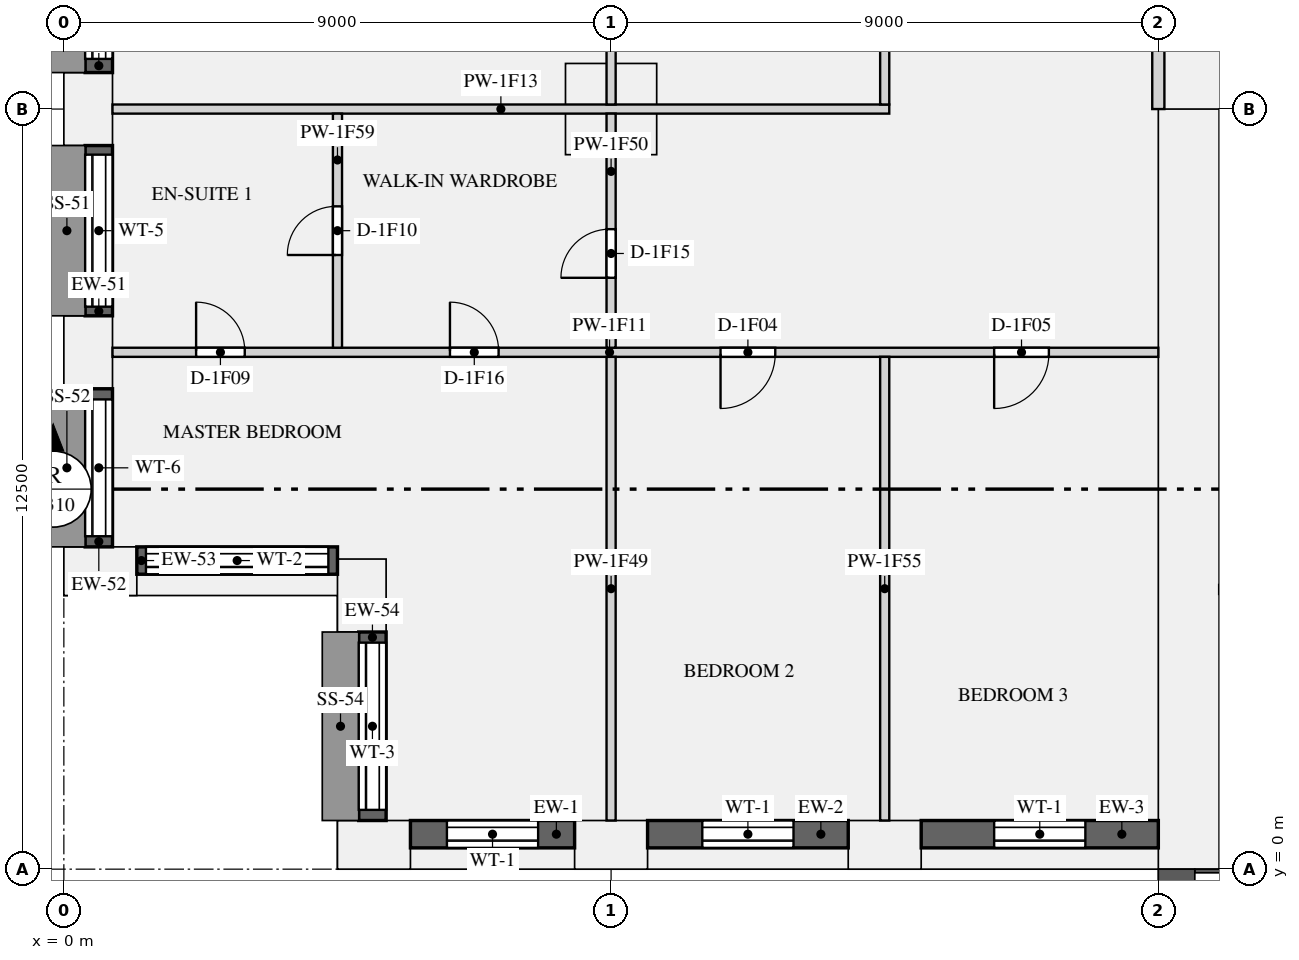
"""IFC4 building model, lengths in metres.
Left out: names, types, materials, properties, quantities, classifications, styles, units other than length and angle.
Written with IfcOpenShell. Run it as: python <this file> out.ifc"""

import sys

from ifc_helpers import new_model, si_unit, direction, frame, frame_2d, origin, origin_2d, place, context, subcontext, project, spatial, rectangle, extrude, element, fill, save


model = new_model("IFC4")
c1 = context("Model", 3, precision=1e-05, world=origin(), true_north=direction((0.0, 1.0)))
c2 = subcontext(c1, "Body", "Model", "MODEL_VIEW")
j1 = project(units=[si_unit("LENGTHUNIT", "METRE"), si_unit("PLANEANGLEUNIT", "RADIAN")], contexts=[c1])
p1 = place(None, origin())
s1 = spatial("IfcSite", under=j1, at=p1, CompositionType="ELEMENT")
p2 = place(p1, origin())
s2 = spatial("IfcBuilding", under=s1, at=p2, CompositionType="ELEMENT")
p3 = place(p2, frame((0.0, 0.0, 60.45)))
s3 = spatial("IfcBuildingStorey", under=s2, at=p3, CompositionType="ELEMENT", Elevation=60.45)
for number, where, z_axis, x_axis in (
    (1, (5.1, 0.4, 0.0), (0.0, 0.0, 1.0), (1.0, 0.0, 0.0)),
    (2, (9.0, 0.4, 0.0), (0.0, 0.0, 1.0), (1.0, 0.0, 0.0)),
    (3, (13.5, 0.4, 0.0), (0.0, 0.0, 1.0), (1.0, 0.0, 0.0)),
    (4, (0.4, 12.5, 0.0), (0.0, 0.0, 1.0), (0.0, -1.0, 0.0)),
    (5, (0.4, 8.5, 0.0), (0.0, 0.0, 1.0), (0.0, -1.0, 0.0)),
    (6, (0.6, 4.9, 0.0), (0.0, 0.0, 1.0), (1.0, 0.0, 0.0)),
    (7, (4.9, 4.5, 0.0), (0.0, 0.0, 1.0), (0.0, -1.0, 0.0)),
):
    element("IfcColumn", number, at=place(p3, frame(where, z_axis=z_axis, x_axis=x_axis)), inside=s3, PredefinedType="USERDEFINED", context=c2, shape_type="SweptSolid", body=[
        extrude(rectangle(XDim=1.2, YDim=0.8, at=origin_2d()), origin(), (0.0, 0.0, 1.0), 3.15),
    ])
p4 = place(p3, frame((9.0, 12.5, 0.0), z_axis=(0.0, 0.0, 1.0), x_axis=(1.0, 0.0, 0.0)))
e8 = element("IfcColumn", 8, at=p4, inside=s3, PredefinedType="COLUMN", context=c2, shape_type="SweptSolid", body=[
    extrude(rectangle(XDim=1.5, YDim=1.5, at=origin_2d()), origin(), (0.0, 0.0, 1.0), 3.15),
])
p5 = place(p3, frame((18.5, 0.0, 0.0), z_axis=(0.0, 0.0, 1.0), x_axis=(0.0, 1.0, 0.0)))
e9 = element("IfcWall", 9, at=p5, inside=s3, PredefinedType="SHEAR", context=c2, shape_type="SweptSolid", body=[
    extrude(rectangle(XDim=12.5, YDim=1.0, at=frame_2d((6.25, 0.0))), origin(), (0.0, 0.0, 1.0), 3.15),
])
p6 = place(p3, frame((5.7, 0.575, 0.9), z_axis=(0.0, 0.0, 1.0), x_axis=(1.0, 0.0, 0.0)))
e10 = element("IfcWall", 10, at=p6, inside=s3, PredefinedType="SOLIDWALL", context=c2, shape_type="SweptSolid", body=[
    extrude(rectangle(XDim=2.7, YDim=0.45, at=frame_2d((1.35, 0.0))), origin(), (0.0, 0.0, 1.0), 1.93),
])
p7 = place(p6, frame((0.6, 0.0, 0.15)))
e11 = element("IfcOpeningElement", 11, at=p7, cuts=e10, PredefinedType="OPENING", context=c2, shape_type="SweptSolid", body=[
    extrude(rectangle(XDim=1.5, YDim=1.5, at=frame_2d((0.75, 0.75))), frame((0.0, 0.235, 0.0), z_axis=(0.0, -1.0, 0.0), x_axis=(1.0, 0.0, 0.0)), (0.0, 0.0, 1.0), 0.47),
])
p8 = place(p3, frame((9.6, 0.575, 0.9), z_axis=(0.0, 0.0, 1.0), x_axis=(1.0, 0.0, 0.0)))
e12 = element("IfcWall", 12, at=p8, inside=s3, PredefinedType="SOLIDWALL", context=c2, shape_type="SweptSolid", body=[
    extrude(rectangle(XDim=3.3, YDim=0.45, at=frame_2d((1.65, 0.0))), origin(), (0.0, 0.0, 1.0), 1.93),
])
p9 = place(p8, frame((0.9, 0.0, 0.15)))
e13 = element("IfcOpeningElement", 13, at=p9, cuts=e12, PredefinedType="OPENING", context=c2, shape_type="SweptSolid", body=[
    extrude(rectangle(XDim=1.5, YDim=1.5, at=frame_2d((0.75, 0.75))), frame((0.0, 0.235, 0.0), z_axis=(0.0, -1.0, 0.0), x_axis=(1.0, 0.0, 0.0)), (0.0, 0.0, 1.0), 0.47),
])
p10 = place(p3, frame((14.1, 0.575, 0.9), z_axis=(0.0, 0.0, 1.0), x_axis=(1.0, 0.0, 0.0)))
e14 = element("IfcWall", 14, at=p10, inside=s3, PredefinedType="SOLIDWALL", context=c2, shape_type="SweptSolid", body=[
    extrude(rectangle(XDim=3.9, YDim=0.45, at=frame_2d((1.95, 0.0))), origin(), (0.0, 0.0, 1.0), 1.93),
])
p11 = place(p10, frame((1.2, 0.0, 0.15)))
e15 = element("IfcOpeningElement", 15, at=p11, cuts=e14, PredefinedType="OPENING", context=c2, shape_type="SweptSolid", body=[
    extrude(rectangle(XDim=1.5, YDim=1.5, at=frame_2d((0.75, 0.75))), frame((0.0, 0.235, 0.0), z_axis=(0.0, -1.0, 0.0), x_axis=(1.0, 0.0, 0.0)), (0.0, 0.0, 1.0), 0.47),
])
p12 = place(p3, frame((0.575, 15.3, 0.9), z_axis=(0.0, 0.0, 1.0), x_axis=(0.0, -1.0, 0.0)))
e16 = element("IfcWall", 16, at=p12, inside=s3, PredefinedType="SOLIDWALL", context=c2, shape_type="SweptSolid", body=[
    extrude(rectangle(XDim=2.2, YDim=0.45, at=frame_2d((1.1, 0.0))), origin(), (0.0, 0.0, 1.0), 1.93),
])
p13 = place(p12, frame((0.225, 0.0, 0.15)))
e17 = element("IfcOpeningElement", 17, at=p13, cuts=e16, PredefinedType="OPENING", context=c2, shape_type="SweptSolid", body=[
    extrude(rectangle(XDim=1.75, YDim=1.5, at=frame_2d((0.875, 0.75))), frame((0.0, 0.235, 0.0), z_axis=(0.0, -1.0, 0.0), x_axis=(1.0, 0.0, 0.0)), (0.0, 0.0, 1.0), 0.47),
])
p14 = place(p3, frame((0.575, 11.9, 0.9), z_axis=(0.0, 0.0, 1.0), x_axis=(0.0, -1.0, 0.0)))
e18 = element("IfcWall", 18, at=p14, inside=s3, PredefinedType="SOLIDWALL", context=c2, shape_type="SweptSolid", body=[
    extrude(rectangle(XDim=2.8, YDim=0.45, at=frame_2d((1.4, 0.0))), origin(), (0.0, 0.0, 1.0), 1.93),
])
p15 = place(p14, frame((0.15, 0.0, 0.15)))
e19 = element("IfcOpeningElement", 19, at=p15, cuts=e18, PredefinedType="OPENING", context=c2, shape_type="SweptSolid", body=[
    extrude(rectangle(XDim=2.5, YDim=1.5, at=frame_2d((1.25, 0.75))), frame((0.0, 0.235, 0.0), z_axis=(0.0, -1.0, 0.0), x_axis=(1.0, 0.0, 0.0)), (0.0, 0.0, 1.0), 0.47),
])
p16 = place(p3, frame((0.575, 7.9, 0.9), z_axis=(0.0, 0.0, 1.0), x_axis=(0.0, -1.0, 0.0)))
e20 = element("IfcWall", 20, at=p16, inside=s3, PredefinedType="SOLIDWALL", context=c2, shape_type="SweptSolid", body=[
    extrude(rectangle(XDim=2.6, YDim=0.45, at=frame_2d((1.3, 0.0))), origin(), (0.0, 0.0, 1.0), 1.93),
])
p17 = place(p16, frame((0.175, 0.0, 0.15)))
e21 = element("IfcOpeningElement", 21, at=p17, cuts=e20, PredefinedType="OPENING", context=c2, shape_type="SweptSolid", body=[
    extrude(rectangle(XDim=2.25, YDim=1.5, at=frame_2d((1.125, 0.75))), frame((0.0, 0.235, 0.0), z_axis=(0.0, -1.0, 0.0), x_axis=(1.0, 0.0, 0.0)), (0.0, 0.0, 1.0), 0.47),
])
p18 = place(p3, frame((1.2, 5.075, 0.9), z_axis=(0.0, 0.0, 1.0), x_axis=(1.0, 0.0, 0.0)))
e22 = element("IfcWall", 22, at=p18, inside=s3, PredefinedType="SOLIDWALL", context=c2, shape_type="SweptSolid", body=[
    extrude(rectangle(XDim=3.3, YDim=0.45, at=frame_2d((1.65, 0.0))), origin(), (0.0, 0.0, 1.0), 1.93),
])
p19 = place(p18, frame((0.15, 0.0, 0.15)))
e23 = element("IfcOpeningElement", 23, at=p19, cuts=e22, PredefinedType="OPENING", context=c2, shape_type="SweptSolid", body=[
    extrude(rectangle(XDim=3.0, YDim=1.5, at=frame_2d((1.5, 0.75))), frame((0.0, 0.235, 0.0), z_axis=(0.0, -1.0, 0.0), x_axis=(1.0, 0.0, 0.0)), (0.0, 0.0, 1.0), 0.47),
])
p20 = place(p3, frame((5.075, 3.9, 0.9), z_axis=(0.0, 0.0, 1.0), x_axis=(0.0, -1.0, 0.0)))
e24 = element("IfcWall", 24, at=p20, inside=s3, PredefinedType="SOLIDWALL", context=c2, shape_type="SweptSolid", body=[
    extrude(rectangle(XDim=3.1, YDim=0.45, at=frame_2d((1.55, 0.0))), origin(), (0.0, 0.0, 1.0), 1.93),
])
p21 = place(p20, frame((0.175, 0.0, 0.15)))
e25 = element("IfcOpeningElement", 25, at=p21, cuts=e24, PredefinedType="OPENING", context=c2, shape_type="SweptSolid", body=[
    extrude(rectangle(XDim=2.75, YDim=1.5, at=frame_2d((1.375, 0.75))), frame((0.0, 0.235, 0.0), z_axis=(0.0, -1.0, 0.0), x_axis=(1.0, 0.0, 0.0)), (0.0, 0.0, 1.0), 0.47),
])
p22 = place(p3, frame((19.0, 4.6, 0.0), z_axis=(0.0, 0.0, 1.0), x_axis=(1.0, 0.0, 0.0)))
e26 = element("IfcWall", 26, at=p22, inside=s3, PredefinedType="PARTITIONING", context=c2, shape_type="SweptSolid", body=[
    extrude(rectangle(XDim=8.3, YDim=0.15, at=frame_2d((4.15, 0.0))), origin(), (0.0, 0.0, 1.0), 2.83),
])
p23 = place(p22, frame((0.45, 0.0, 0.0)))
e27 = element("IfcOpeningElement", 27, at=p23, cuts=e26, PredefinedType="OPENING", context=c2, shape_type="SweptSolid", body=[
    extrude(rectangle(XDim=0.9, YDim=2.1, at=frame_2d((0.45, 1.05))), frame((0.0, 0.085, 0.0), z_axis=(0.0, -1.0, 0.0), x_axis=(1.0, 0.0, 0.0)), (0.0, 0.0, 1.0), 0.17),
])
p24 = place(p3, frame((18.0, 12.5, 0.0), z_axis=(0.0, 0.0, 1.0), x_axis=(0.0, 1.0, 0.0)))
e28 = element("IfcWall", 28, at=p24, inside=s3, PredefinedType="PARTITIONING", context=c2, shape_type="SweptSolid", body=[
    extrude(rectangle(XDim=3.4, YDim=0.2, at=frame_2d((1.7, 0.0))), origin(), (0.0, 0.0, 1.0), 2.83),
])
p25 = place(p3, frame((0.8, 8.5, 0.0), z_axis=(0.0, 0.0, 1.0), x_axis=(1.0, 0.0, 0.0)))
e29 = element("IfcWall", 29, at=p25, inside=s3, PredefinedType="PARTITIONING", context=c2, shape_type="SweptSolid", body=[
    extrude(rectangle(XDim=17.2, YDim=0.15, at=frame_2d((8.6, 0.0))), origin(), (0.0, 0.0, 1.0), 2.83),
])
p26 = place(p25, frame((10.0, 0.0, 0.0)))
e30 = element("IfcOpeningElement", 30, at=p26, cuts=e29, PredefinedType="OPENING", context=c2, shape_type="SweptSolid", body=[
    extrude(rectangle(XDim=0.9, YDim=2.1, at=frame_2d((0.45, 1.05))), frame((0.0, 0.085, 0.0), z_axis=(0.0, -1.0, 0.0), x_axis=(1.0, 0.0, 0.0)), (0.0, 0.0, 1.0), 0.17),
])
p27 = place(p25, frame((14.5, 0.0, 0.0)))
e31 = element("IfcOpeningElement", 31, at=p27, cuts=e29, PredefinedType="OPENING", context=c2, shape_type="SweptSolid", body=[
    extrude(rectangle(XDim=0.9, YDim=2.1, at=frame_2d((0.45, 1.05))), frame((0.0, 0.085, 0.0), z_axis=(0.0, -1.0, 0.0), x_axis=(1.0, 0.0, 0.0)), (0.0, 0.0, 1.0), 0.17),
])
p28 = place(p25, frame((1.375, 0.0, 0.0)))
e32 = element("IfcOpeningElement", 32, at=p28, cuts=e29, PredefinedType="OPENING", context=c2, shape_type="SweptSolid", body=[
    extrude(rectangle(XDim=0.8, YDim=2.1, at=frame_2d((0.4, 1.05))), frame((0.0, 0.085, 0.0), z_axis=(0.0, -1.0, 0.0), x_axis=(1.0, 0.0, 0.0)), (0.0, 0.0, 1.0), 0.17),
])
p29 = place(p25, frame((5.55, 0.0, 0.0)))
e33 = element("IfcOpeningElement", 33, at=p29, cuts=e29, PredefinedType="OPENING", context=c2, shape_type="SweptSolid", body=[
    extrude(rectangle(XDim=0.8, YDim=2.1, at=frame_2d((0.4, 1.05))), frame((0.0, 0.085, 0.0), z_axis=(0.0, -1.0, 0.0), x_axis=(1.0, 0.0, 0.0)), (0.0, 0.0, 1.0), 0.17),
])
p30 = place(p3, frame((0.8, 12.5, 0.0), z_axis=(0.0, 0.0, 1.0), x_axis=(1.0, 0.0, 0.0)))
e34 = element("IfcWall", 34, at=p30, inside=s3, PredefinedType="PARTITIONING", context=c2, shape_type="SweptSolid", body=[
    extrude(rectangle(XDim=12.775, YDim=0.15, at=frame_2d((6.387, 0.0))), origin(), (0.0, 0.0, 1.0), 2.83),
])
p31 = place(p3, frame((9.0, 0.8, 0.0), z_axis=(0.0, 0.0, 1.0), x_axis=(0.0, 1.0, 0.0)))
e35 = element("IfcWall", 35, at=p31, inside=s3, PredefinedType="PARTITIONING", context=c2, shape_type="SweptSolid", body=[
    extrude(rectangle(XDim=7.625, YDim=0.15, at=frame_2d((3.812, 0.0))), origin(), (0.0, 0.0, 1.0), 2.83),
])
p32 = place(p3, frame((9.0, 8.575, 0.0), z_axis=(0.0, 0.0, 1.0), x_axis=(0.0, 1.0, 0.0)))
e36 = element("IfcWall", 36, at=p32, inside=s3, PredefinedType="PARTITIONING", context=c2, shape_type="SweptSolid", body=[
    extrude(rectangle(XDim=3.85, YDim=0.15, at=frame_2d((1.925, 0.0))), origin(), (0.0, 0.0, 1.0), 2.83),
])
p33 = place(p32, frame((1.15, 0.0, 0.0)))
e37 = element("IfcOpeningElement", 37, at=p33, cuts=e36, PredefinedType="OPENING", context=c2, shape_type="SweptSolid", body=[
    extrude(rectangle(XDim=0.8, YDim=2.1, at=frame_2d((0.4, 1.05))), frame((0.0, 0.085, 0.0), z_axis=(0.0, -1.0, 0.0), x_axis=(1.0, 0.0, 0.0)), (0.0, 0.0, 1.0), 0.17),
])
p34 = place(p3, frame((9.0, 12.575, 0.0), z_axis=(0.0, 0.0, 1.0), x_axis=(0.0, 1.0, 0.0)))
e38 = element("IfcWall", 38, at=p34, inside=s3, PredefinedType="PARTITIONING", context=c2, shape_type="SweptSolid", body=[
    extrude(rectangle(XDim=19.725, YDim=0.15, at=frame_2d((9.863, 0.0))), origin(), (0.0, 0.0, 1.0), 2.83),
])
p35 = place(p34, frame((15.537, 0.0, 0.0)))
e39 = element("IfcOpeningElement", 39, at=p35, cuts=e38, PredefinedType="OPENING", context=c2, shape_type="SweptSolid", body=[
    extrude(rectangle(XDim=0.9, YDim=2.1, at=frame_2d((0.45, 1.05))), frame((0.0, 0.085, 0.0), z_axis=(0.0, -1.0, 0.0), x_axis=(1.0, 0.0, 0.0)), (0.0, 0.0, 1.0), 0.17),
])
p36 = place(p34, frame((6.85, 0.0, 0.0)))
e40 = element("IfcOpeningElement", 40, at=p36, cuts=e38, PredefinedType="OPENING", context=c2, shape_type="SweptSolid", body=[
    extrude(rectangle(XDim=0.9, YDim=2.1, at=frame_2d((0.45, 1.05))), frame((0.0, 0.085, 0.0), z_axis=(0.0, -1.0, 0.0), x_axis=(1.0, 0.0, 0.0)), (0.0, 0.0, 1.0), 0.17),
])
p37 = place(p3, frame((13.5, 0.8, 0.0), z_axis=(0.0, 0.0, 1.0), x_axis=(0.0, 1.0, 0.0)))
e41 = element("IfcWall", 41, at=p37, inside=s3, PredefinedType="PARTITIONING", context=c2, shape_type="SweptSolid", body=[
    extrude(rectangle(XDim=7.625, YDim=0.15, at=frame_2d((3.812, 0.0))), origin(), (0.0, 0.0, 1.0), 2.83),
])
p38 = place(p3, frame((13.5, 12.575, 0.0), z_axis=(0.0, 0.0, 1.0), x_axis=(0.0, 1.0, 0.0)))
e42 = element("IfcWall", 42, at=p38, inside=s3, PredefinedType="PARTITIONING", context=c2, shape_type="SweptSolid", body=[
    extrude(rectangle(XDim=3.85, YDim=0.15, at=frame_2d((1.925, 0.0))), origin(), (0.0, 0.0, 1.0), 2.83),
])
p39 = place(p3, frame((4.5, 8.575, 0.0), z_axis=(0.0, 0.0, 1.0), x_axis=(0.0, 1.0, 0.0)))
e43 = element("IfcWall", 43, at=p39, inside=s3, PredefinedType="PARTITIONING", context=c2, shape_type="SweptSolid", body=[
    extrude(rectangle(XDim=3.85, YDim=0.15, at=frame_2d((1.925, 0.0))), origin(), (0.0, 0.0, 1.0), 2.83),
])
p40 = place(p39, frame((1.525, 0.0, 0.0)))
e44 = element("IfcOpeningElement", 44, at=p40, cuts=e43, PredefinedType="OPENING", context=c2, shape_type="SweptSolid", body=[
    extrude(rectangle(XDim=0.8, YDim=2.1, at=frame_2d((0.4, 1.05))), frame((0.0, 0.085, 0.0), z_axis=(0.0, -1.0, 0.0), x_axis=(1.0, 0.0, 0.0)), (0.0, 0.0, 1.0), 0.17),
])
p41 = place(p7, origin())
e45 = element("IfcWindow", 45, at=p41, inside=s3, PartitioningType="SINGLE_PANEL", PredefinedType="WINDOW", context=c2, shape_type="SweptSolid", body=[
    extrude(rectangle(XDim=1.5, YDim=1.5, at=frame_2d((0.75, 0.75))), frame((0.0, -0.065, 0.0), z_axis=(0.0, -1.0, 0.0), x_axis=(1.0, 0.0, 0.0)), (0.0, 0.0, 1.0), 0.06),
])
fill(e11, e45)
p42 = place(p9, origin())
e46 = element("IfcWindow", 46, at=p42, inside=s3, PartitioningType="SINGLE_PANEL", PredefinedType="WINDOW", context=c2, shape_type="SweptSolid", body=[
    extrude(rectangle(XDim=1.5, YDim=1.5, at=frame_2d((0.75, 0.75))), frame((0.0, -0.065, 0.0), z_axis=(0.0, -1.0, 0.0), x_axis=(1.0, 0.0, 0.0)), (0.0, 0.0, 1.0), 0.06),
])
fill(e13, e46)
p43 = place(p11, origin())
e47 = element("IfcWindow", 47, at=p43, inside=s3, PartitioningType="SINGLE_PANEL", PredefinedType="WINDOW", context=c2, shape_type="SweptSolid", body=[
    extrude(rectangle(XDim=1.5, YDim=1.5, at=frame_2d((0.75, 0.75))), frame((0.0, -0.065, 0.0), z_axis=(0.0, -1.0, 0.0), x_axis=(1.0, 0.0, 0.0)), (0.0, 0.0, 1.0), 0.06),
])
fill(e15, e47)
p44 = place(p13, origin())
e48 = element("IfcWindow", 48, at=p44, inside=s3, PartitioningType="SINGLE_PANEL", PredefinedType="WINDOW", context=c2, shape_type="SweptSolid", body=[
    extrude(rectangle(XDim=1.75, YDim=1.5, at=frame_2d((0.875, 0.75))), frame((0.0, -0.065, 0.0), z_axis=(0.0, -1.0, 0.0), x_axis=(1.0, 0.0, 0.0)), (0.0, 0.0, 1.0), 0.06),
])
fill(e17, e48)
p45 = place(p15, origin())
e49 = element("IfcWindow", 49, at=p45, inside=s3, PartitioningType="SINGLE_PANEL", PredefinedType="WINDOW", context=c2, shape_type="SweptSolid", body=[
    extrude(rectangle(XDim=2.5, YDim=1.5, at=frame_2d((1.25, 0.75))), frame((0.0, -0.065, 0.0), z_axis=(0.0, -1.0, 0.0), x_axis=(1.0, 0.0, 0.0)), (0.0, 0.0, 1.0), 0.06),
])
fill(e19, e49)
p46 = place(p17, origin())
e50 = element("IfcWindow", 50, at=p46, inside=s3, PartitioningType="SINGLE_PANEL", PredefinedType="WINDOW", context=c2, shape_type="SweptSolid", body=[
    extrude(rectangle(XDim=2.25, YDim=1.5, at=frame_2d((1.125, 0.75))), frame((0.0, -0.065, 0.0), z_axis=(0.0, -1.0, 0.0), x_axis=(1.0, 0.0, 0.0)), (0.0, 0.0, 1.0), 0.06),
])
fill(e21, e50)
p47 = place(p19, origin())
e51 = element("IfcWindow", 51, at=p47, inside=s3, PartitioningType="SINGLE_PANEL", PredefinedType="WINDOW", context=c2, shape_type="SweptSolid", body=[
    extrude(rectangle(XDim=3.0, YDim=1.5, at=frame_2d((1.5, 0.75))), frame((0.0, -0.065, 0.0), z_axis=(0.0, -1.0, 0.0), x_axis=(1.0, 0.0, 0.0)), (0.0, 0.0, 1.0), 0.06),
])
fill(e23, e51)
p48 = place(p21, origin())
e52 = element("IfcWindow", 52, at=p48, inside=s3, PartitioningType="SINGLE_PANEL", PredefinedType="WINDOW", context=c2, shape_type="SweptSolid", body=[
    extrude(rectangle(XDim=2.75, YDim=1.5, at=frame_2d((1.375, 0.75))), frame((0.0, -0.065, 0.0), z_axis=(0.0, -1.0, 0.0), x_axis=(1.0, 0.0, 0.0)), (0.0, 0.0, 1.0), 0.06),
])
fill(e25, e52)
p49 = place(p26, frame((0.9, 0.0, 0.0), z_axis=(0.0, 0.0, 1.0), x_axis=(-1.0, 0.0, 0.0)))
e53 = element("IfcDoor", 53, at=p49, inside=s3, OperationType="SINGLE_SWING_RIGHT", PredefinedType="DOOR", context=c2, shape_type="SweptSolid", body=[
    extrude(rectangle(XDim=0.9, YDim=2.1, at=frame_2d((0.45, 1.05))), frame((0.0, 0.025, 0.0), z_axis=(0.0, -1.0, 0.0), x_axis=(1.0, 0.0, 0.0)), (0.0, 0.0, 1.0), 0.05),
])
fill(e30, e53)
p50 = place(p27, frame((0.9, 0.0, 0.0), z_axis=(0.0, 0.0, 1.0), x_axis=(-1.0, 0.0, 0.0)))
e54 = element("IfcDoor", 54, at=p50, inside=s3, OperationType="SINGLE_SWING_RIGHT", PredefinedType="DOOR", context=c2, shape_type="SweptSolid", body=[
    extrude(rectangle(XDim=0.9, YDim=2.1, at=frame_2d((0.45, 1.05))), frame((0.0, 0.025, 0.0), z_axis=(0.0, -1.0, 0.0), x_axis=(1.0, 0.0, 0.0)), (0.0, 0.0, 1.0), 0.05),
])
fill(e31, e54)
p51 = place(p28, origin())
e55 = element("IfcDoor", 55, at=p51, inside=s3, OperationType="SINGLE_SWING_LEFT", PredefinedType="DOOR", context=c2, shape_type="SweptSolid", body=[
    extrude(rectangle(XDim=0.8, YDim=2.1, at=frame_2d((0.4, 1.05))), frame((0.0, 0.025, 0.0), z_axis=(0.0, -1.0, 0.0), x_axis=(1.0, 0.0, 0.0)), (0.0, 0.0, 1.0), 0.05),
])
fill(e32, e55)
p52 = place(p40, origin())
e56 = element("IfcDoor", 56, at=p52, inside=s3, OperationType="SINGLE_SWING_LEFT", PredefinedType="DOOR", context=c2, shape_type="SweptSolid", body=[
    extrude(rectangle(XDim=0.8, YDim=2.1, at=frame_2d((0.4, 1.05))), frame((0.0, 0.025, 0.0), z_axis=(0.0, -1.0, 0.0), x_axis=(1.0, 0.0, 0.0)), (0.0, 0.0, 1.0), 0.05),
])
fill(e44, e56)
p53 = place(p33, origin())
e57 = element("IfcDoor", 57, at=p53, inside=s3, OperationType="SINGLE_SWING_LEFT", PredefinedType="DOOR", context=c2, shape_type="SweptSolid", body=[
    extrude(rectangle(XDim=0.8, YDim=2.1, at=frame_2d((0.4, 1.05))), frame((0.0, 0.025, 0.0), z_axis=(0.0, -1.0, 0.0), x_axis=(1.0, 0.0, 0.0)), (0.0, 0.0, 1.0), 0.05),
])
fill(e37, e57)
p54 = place(p29, origin())
e58 = element("IfcDoor", 58, at=p54, inside=s3, OperationType="SINGLE_SWING_LEFT", PredefinedType="DOOR", context=c2, shape_type="SweptSolid", body=[
    extrude(rectangle(XDim=0.8, YDim=2.1, at=frame_2d((0.4, 1.05))), frame((0.0, 0.025, 0.0), z_axis=(0.0, -1.0, 0.0), x_axis=(1.0, 0.0, 0.0)), (0.0, 0.0, 1.0), 0.05),
])
fill(e33, e58)
save(model, sys.argv[1])
